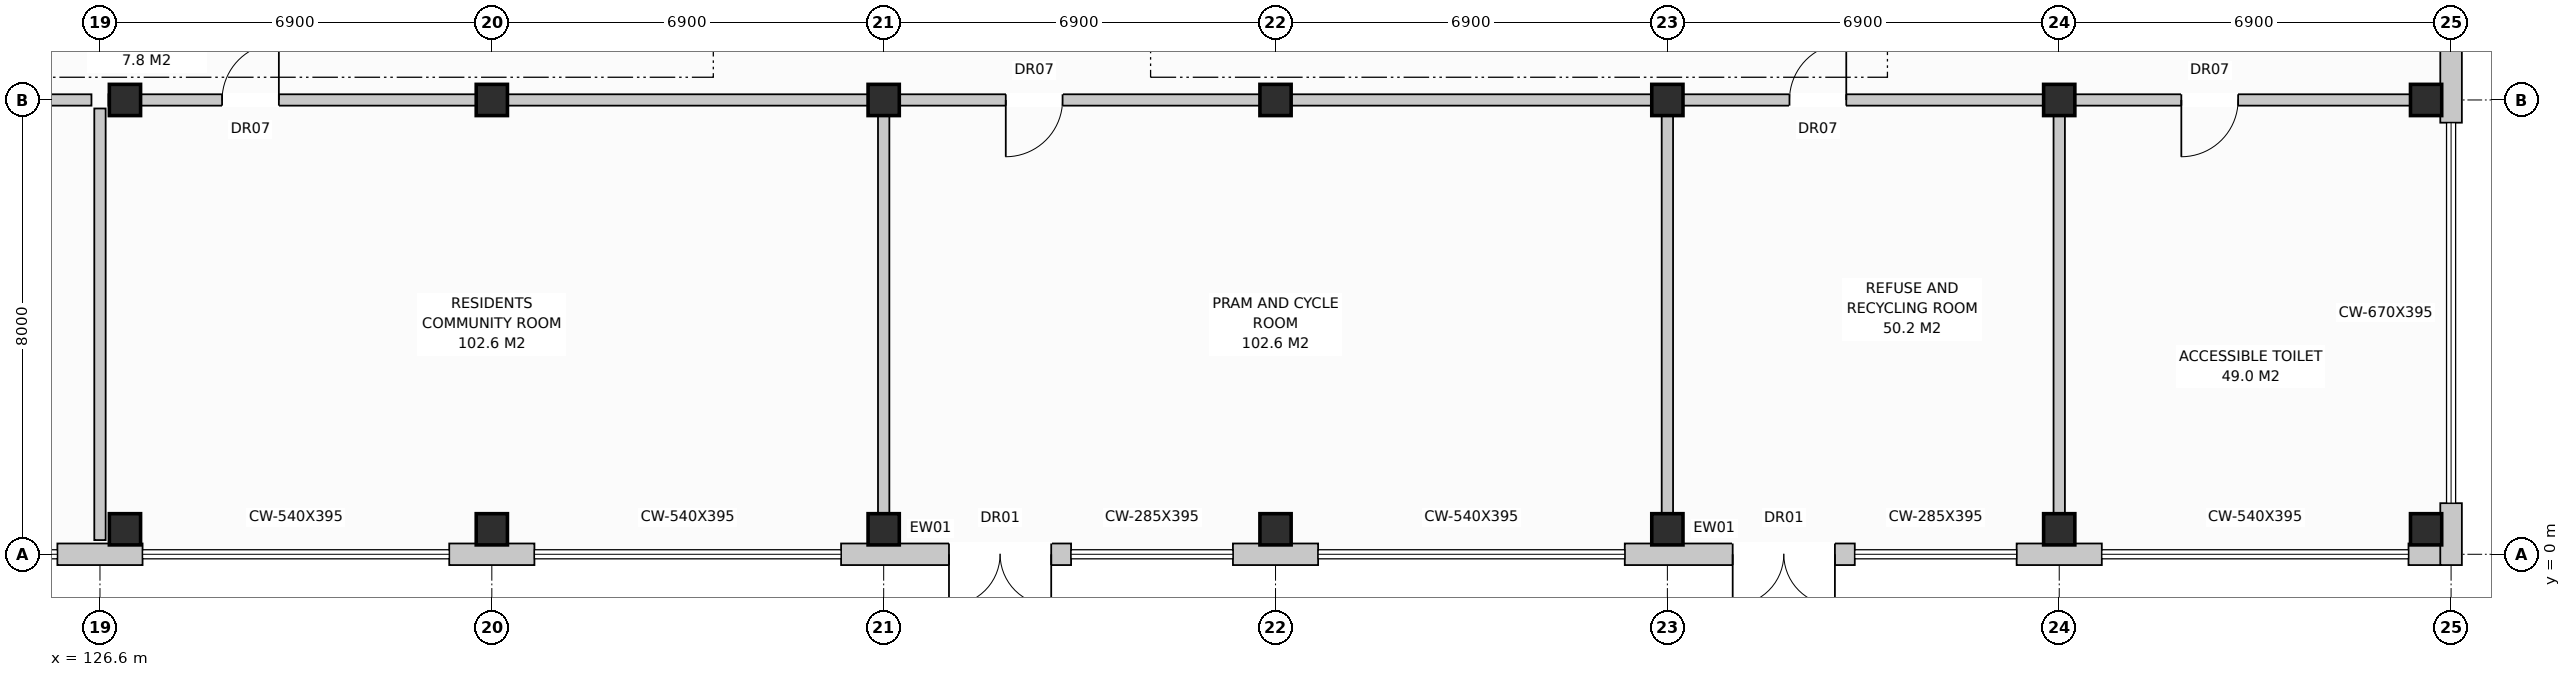
"""IFC4 building model, lengths in metres.
Left out: names, types, materials, properties, quantities, classifications, styles, units other than length and angle.
Written with IfcOpenShell. Run it as: python <this file> out.ifc"""

import sys

from ifc_helpers import new_model, si_unit, direction, frame, frame_2d, origin, origin_with_axes, origin_2d, place, context, subcontext, project, spatial, rectangle, extrude, element, fill, save


model = new_model("IFC4")
c1 = context("Model", 3, precision=1e-05, world=origin(), true_north=direction((0.0, 1.0)))
c2 = subcontext(c1, "Body", "Model", "MODEL_VIEW")
j1 = project(units=[si_unit("LENGTHUNIT", "METRE"), si_unit("PLANEANGLEUNIT", "RADIAN")], contexts=[c1])
p1 = place(None, origin())
s1 = spatial("IfcSite", under=j1, at=p1, CompositionType="ELEMENT")
p2 = place(p1, origin())
s2 = spatial("IfcBuilding", under=s1, at=p2, CompositionType="ELEMENT")
p3 = place(p2, origin())
s3 = spatial("IfcBuildingStorey", under=s2, at=p3, CompositionType="ELEMENT", Elevation=0.0)
for number, where, z_axis, x_axis in (
    (1, (127.04, 0.44, 0.0), (0.0, 0.0, 1.0), (1.0, 0.0, 0.0)),
    (2, (127.04, 8.0, 0.0), (0.0, 0.0, 1.0), (1.0, 0.0, 0.0)),
    (3, (133.5, 0.44, 0.0), (0.0, 0.0, 1.0), (1.0, 0.0, 0.0)),
    (4, (133.5, 8.0, 0.0), (0.0, 0.0, 1.0), (1.0, 0.0, 0.0)),
    (5, (140.4, 0.44, 0.0), (0.0, 0.0, 1.0), (1.0, 0.0, 0.0)),
    (6, (140.4, 8.0, 0.0), (0.0, 0.0, 1.0), (1.0, 0.0, 0.0)),
    (7, (147.3, 0.44, 0.0), (0.0, 0.0, 1.0), (1.0, 0.0, 0.0)),
    (8, (147.3, 8.0, 0.0), (0.0, 0.0, 1.0), (1.0, 0.0, 0.0)),
    (9, (154.2, 0.44, 0.0), (0.0, 0.0, 1.0), (1.0, 0.0, 0.0)),
    (10, (154.2, 8.0, 0.0), (0.0, 0.0, 1.0), (1.0, 0.0, 0.0)),
    (11, (161.1, 0.44, 0.0), (0.0, 0.0, 1.0), (1.0, 0.0, 0.0)),
    (12, (161.1, 8.0, 0.0), (0.0, 0.0, 1.0), (1.0, 0.0, 0.0)),
    (13, (167.56, 0.44, 0.0), (0.0, 0.0, 1.0), (1.0, 0.0, 0.0)),
    (14, (167.56, 8.0, 0.0), (0.0, 0.0, 1.0), (1.0, 0.0, 0.0)),
):
    element("IfcColumn", number, at=place(p3, frame(where, z_axis=z_axis, x_axis=x_axis)), inside=s3, PredefinedType="COLUMN", context=c2, shape_type="SweptSolid", body=[
        extrude(rectangle(XDim=0.55, YDim=0.55, at=origin_2d()), origin(), (0.0, 0.0, 1.0), 4.4),
    ])
for number, where, z_axis, x_axis in (
    (15, (125.85, 0.0, 0.0), (0.0, 0.0, 1.0), (1.0, 0.0, 0.0)),
    (16, (132.75, 0.0, 0.0), (0.0, 0.0, 1.0), (1.0, 0.0, 0.0)),
):
    element("IfcWall", number, at=place(p3, frame(where, z_axis=z_axis, x_axis=x_axis)), inside=s3, PredefinedType="STANDARD", context=c2, shape_type="SweptSolid", body=[
        extrude(rectangle(XDim=1.5, YDim=0.38, at=frame_2d((0.75, 0.0))), origin(), (0.0, 0.0, 1.0), 4.12),
    ])
p4 = place(p3, frame((139.65, 0.0, 0.0), z_axis=(0.0, 0.0, 1.0), x_axis=(1.0, 0.0, 0.0)))
e17 = element("IfcWall", 17, at=p4, inside=s3, PredefinedType="STANDARD", context=c2, shape_type="SweptSolid", body=[
    extrude(rectangle(XDim=4.05, YDim=0.38, at=frame_2d((2.025, 0.0))), origin(), (0.0, 0.0, 1.0), 4.12),
])
p5 = place(p4, frame((1.9, 0.0, 0.0)))
e18 = element("IfcOpeningElement", 18, at=p5, cuts=e17, PredefinedType="OPENING", context=c2, shape_type="SweptSolid", body=[
    extrude(rectangle(XDim=1.8, YDim=2.4, at=frame_2d((0.9, 1.2))), frame((0.0, 0.202, 0.0), z_axis=(0.0, -1.0, 0.0), x_axis=(1.0, 0.0, 0.0)), (0.0, 0.0, 1.0), 0.404),
])
p6 = place(p3, frame((146.55, 0.0, 0.0), z_axis=(0.0, 0.0, 1.0), x_axis=(1.0, 0.0, 0.0)))
e19 = element("IfcWall", 19, at=p6, inside=s3, PredefinedType="STANDARD", context=c2, shape_type="SweptSolid", body=[
    extrude(rectangle(XDim=1.5, YDim=0.38, at=frame_2d((0.75, 0.0))), origin(), (0.0, 0.0, 1.0), 4.12),
])
p7 = place(p3, frame((153.45, 0.0, 0.0), z_axis=(0.0, 0.0, 1.0), x_axis=(1.0, 0.0, 0.0)))
e20 = element("IfcWall", 20, at=p7, inside=s3, PredefinedType="STANDARD", context=c2, shape_type="SweptSolid", body=[
    extrude(rectangle(XDim=4.05, YDim=0.38, at=frame_2d((2.025, 0.0))), origin(), (0.0, 0.0, 1.0), 4.12),
])
p8 = place(p7, frame((1.9, 0.0, 0.0)))
e21 = element("IfcOpeningElement", 21, at=p8, cuts=e20, PredefinedType="OPENING", context=c2, shape_type="SweptSolid", body=[
    extrude(rectangle(XDim=1.8, YDim=2.4, at=frame_2d((0.9, 1.2))), frame((0.0, 0.202, 0.0), z_axis=(0.0, -1.0, 0.0), x_axis=(1.0, 0.0, 0.0)), (0.0, 0.0, 1.0), 0.404),
])
p9 = place(p3, frame((160.35, 0.0, 0.0), z_axis=(0.0, 0.0, 1.0), x_axis=(1.0, 0.0, 0.0)))
e22 = element("IfcWall", 22, at=p9, inside=s3, PredefinedType="STANDARD", context=c2, shape_type="SweptSolid", body=[
    extrude(rectangle(XDim=1.5, YDim=0.38, at=frame_2d((0.75, 0.0))), origin(), (0.0, 0.0, 1.0), 4.12),
])
p10 = place(p3, frame((167.25, 0.0, 0.0), z_axis=(0.0, 0.0, 1.0), x_axis=(1.0, 0.0, 0.0)))
e23 = element("IfcWall", 23, at=p10, inside=s3, PredefinedType="STANDARD", context=c2, shape_type="SweptSolid", body=[
    extrude(rectangle(XDim=0.57, YDim=0.38, at=frame_2d((0.285, 0.0))), origin(), (0.0, 0.0, 1.0), 4.12),
])
p11 = place(p3, frame((168.0, -0.19, 0.0), z_axis=(0.0, 0.0, 1.0), x_axis=(0.0, 1.0, 0.0)))
e24 = element("IfcWall", 24, at=p11, inside=s3, PredefinedType="STANDARD", context=c2, shape_type="SweptSolid", body=[
    extrude(rectangle(XDim=1.09, YDim=0.38, at=frame_2d((0.545, 0.0))), origin(), (0.0, 0.0, 1.0), 4.12),
])
p12 = place(p3, frame((168.0, 7.6, 0.0), z_axis=(0.0, 0.0, 1.0), x_axis=(0.0, 1.0, 0.0)))
e25 = element("IfcWall", 25, at=p12, inside=s3, PredefinedType="STANDARD", context=c2, shape_type="SweptSolid", body=[
    extrude(rectangle(XDim=3.2, YDim=0.38, at=frame_2d((1.6, 0.0))), origin(), (0.0, 0.0, 1.0), 4.12),
])
p13 = place(p3, frame((113.1, 8.0, 0.0), z_axis=(0.0, 0.0, 1.0), x_axis=(1.0, 0.0, 0.0)))
e26 = element("IfcWall", 26, at=p13, inside=s3, PredefinedType="PARTITIONING", context=c2, shape_type="SweptSolid", body=[
    extrude(rectangle(XDim=13.35, YDim=0.2, at=frame_2d((6.675, 0.0))), origin(), (0.0, 0.0, 1.0), 3.56),
])
p14 = place(p13, frame((2.0, 0.0, 0.0)))
e27 = element("IfcOpeningElement", 27, at=p14, cuts=e26, PredefinedType="OPENING", context=c2, shape_type="SweptSolid", body=[
    extrude(rectangle(XDim=1.0, YDim=2.15, at=frame_2d((0.5, 1.075))), frame((0.0, 0.112, 0.0), z_axis=(0.0, -1.0, 0.0), x_axis=(1.0, 0.0, 0.0)), (0.0, 0.0, 1.0), 0.224),
])
p15 = place(p3, frame((126.6, 0.25, 0.0), z_axis=(0.0, 0.0, 1.0), x_axis=(0.0, 1.0, 0.0)))
e28 = element("IfcWall", 28, at=p15, inside=s3, PredefinedType="PARTITIONING", context=c2, shape_type="SweptSolid", body=[
    extrude(rectangle(XDim=7.6, YDim=0.2, at=frame_2d((3.8, 0.0))), origin(), (0.0, 0.0, 1.0), 4.12),
])
p16 = place(p3, frame((126.75, 8.0, 0.0), z_axis=(0.0, 0.0, 1.0), x_axis=(1.0, 0.0, 0.0)))
e29 = element("IfcWall", 29, at=p16, inside=s3, PredefinedType="PARTITIONING", context=c2, shape_type="SweptSolid", body=[
    extrude(rectangle(XDim=13.5, YDim=0.2, at=frame_2d((6.75, 0.0))), origin(), (0.0, 0.0, 1.0), 3.56),
])
p17 = place(p16, frame((2.0, 0.0, 0.0)))
e30 = element("IfcOpeningElement", 30, at=p17, cuts=e29, PredefinedType="OPENING", context=c2, shape_type="SweptSolid", body=[
    extrude(rectangle(XDim=1.0, YDim=2.15, at=frame_2d((0.5, 1.075))), frame((0.0, 0.112, 0.0), z_axis=(0.0, -1.0, 0.0), x_axis=(1.0, 0.0, 0.0)), (0.0, 0.0, 1.0), 0.224),
])
p18 = place(p3, frame((140.4, 0.25, 0.0), z_axis=(0.0, 0.0, 1.0), x_axis=(0.0, 1.0, 0.0)))
e31 = element("IfcWall", 31, at=p18, inside=s3, PredefinedType="PARTITIONING", context=c2, shape_type="SweptSolid", body=[
    extrude(rectangle(XDim=7.6, YDim=0.2, at=frame_2d((3.8, 0.0))), origin(), (0.0, 0.0, 1.0), 4.12),
])
p19 = place(p3, frame((140.55, 8.0, 0.0), z_axis=(0.0, 0.0, 1.0), x_axis=(1.0, 0.0, 0.0)))
e32 = element("IfcWall", 32, at=p19, inside=s3, PredefinedType="PARTITIONING", context=c2, shape_type="SweptSolid", body=[
    extrude(rectangle(XDim=13.5, YDim=0.2, at=frame_2d((6.75, 0.0))), origin(), (0.0, 0.0, 1.0), 3.56),
])
p20 = place(p19, frame((2.0, 0.0, 0.0)))
e33 = element("IfcOpeningElement", 33, at=p20, cuts=e32, PredefinedType="OPENING", context=c2, shape_type="SweptSolid", body=[
    extrude(rectangle(XDim=1.0, YDim=2.15, at=frame_2d((0.5, 1.075))), frame((0.0, 0.112, 0.0), z_axis=(0.0, -1.0, 0.0), x_axis=(1.0, 0.0, 0.0)), (0.0, 0.0, 1.0), 0.224),
])
p21 = place(p3, frame((154.2, 0.25, 0.0), z_axis=(0.0, 0.0, 1.0), x_axis=(0.0, 1.0, 0.0)))
e34 = element("IfcWall", 34, at=p21, inside=s3, PredefinedType="PARTITIONING", context=c2, shape_type="SweptSolid", body=[
    extrude(rectangle(XDim=7.6, YDim=0.2, at=frame_2d((3.8, 0.0))), origin(), (0.0, 0.0, 1.0), 4.12),
])
p22 = place(p3, frame((154.35, 8.0, 0.0), z_axis=(0.0, 0.0, 1.0), x_axis=(1.0, 0.0, 0.0)))
e35 = element("IfcWall", 35, at=p22, inside=s3, PredefinedType="PARTITIONING", context=c2, shape_type="SweptSolid", body=[
    extrude(rectangle(XDim=6.6, YDim=0.2, at=frame_2d((3.3, 0.0))), origin(), (0.0, 0.0, 1.0), 3.56),
])
p23 = place(p22, frame((2.0, 0.0, 0.0)))
e36 = element("IfcOpeningElement", 36, at=p23, cuts=e35, PredefinedType="OPENING", context=c2, shape_type="SweptSolid", body=[
    extrude(rectangle(XDim=1.0, YDim=2.15, at=frame_2d((0.5, 1.075))), frame((0.0, 0.112, 0.0), z_axis=(0.0, -1.0, 0.0), x_axis=(1.0, 0.0, 0.0)), (0.0, 0.0, 1.0), 0.224),
])
p24 = place(p3, frame((161.1, 0.25, 0.0), z_axis=(0.0, 0.0, 1.0), x_axis=(0.0, 1.0, 0.0)))
e37 = element("IfcWall", 37, at=p24, inside=s3, PredefinedType="PARTITIONING", context=c2, shape_type="SweptSolid", body=[
    extrude(rectangle(XDim=7.6, YDim=0.2, at=frame_2d((3.8, 0.0))), origin(), (0.0, 0.0, 1.0), 3.56),
])
p25 = place(p3, frame((161.25, 8.0, 0.0), z_axis=(0.0, 0.0, 1.0), x_axis=(1.0, 0.0, 0.0)))
e38 = element("IfcWall", 38, at=p25, inside=s3, PredefinedType="PARTITIONING", context=c2, shape_type="SweptSolid", body=[
    extrude(rectangle(XDim=6.45, YDim=0.2, at=frame_2d((3.225, 0.0))), origin(), (0.0, 0.0, 1.0), 3.56),
])
p26 = place(p25, frame((2.0, 0.0, 0.0)))
e39 = element("IfcOpeningElement", 39, at=p26, cuts=e38, PredefinedType="OPENING", context=c2, shape_type="SweptSolid", body=[
    extrude(rectangle(XDim=1.0, YDim=2.15, at=frame_2d((0.5, 1.075))), frame((0.0, 0.112, 0.0), z_axis=(0.0, -1.0, 0.0), x_axis=(1.0, 0.0, 0.0)), (0.0, 0.0, 1.0), 0.224),
])
p27 = place(p5, frame((1.8, 0.0, 0.0), z_axis=(0.0, 0.0, 1.0), x_axis=(-1.0, 0.0, 0.0)))
e40 = element("IfcDoor", 40, at=p27, inside=s3, OperationType="DOUBLE_DOOR_SINGLE_SWING", PredefinedType="DOOR", context=c2, shape_type="SweptSolid", body=[
    extrude(rectangle(XDim=1.8, YDim=2.4, at=frame_2d((0.9, 1.2))), frame((0.0, 0.025, 0.0), z_axis=(0.0, -1.0, 0.0), x_axis=(1.0, 0.0, 0.0)), (0.0, 0.0, 1.0), 0.05),
])
fill(e18, e40)
p28 = place(p8, frame((1.8, 0.0, 0.0), z_axis=(0.0, 0.0, 1.0), x_axis=(-1.0, 0.0, 0.0)))
e41 = element("IfcDoor", 41, at=p28, inside=s3, OperationType="DOUBLE_DOOR_SINGLE_SWING", PredefinedType="DOOR", context=c2, shape_type="SweptSolid", body=[
    extrude(rectangle(XDim=1.8, YDim=2.4, at=frame_2d((0.9, 1.2))), frame((0.0, 0.025, 0.0), z_axis=(0.0, -1.0, 0.0), x_axis=(1.0, 0.0, 0.0)), (0.0, 0.0, 1.0), 0.05),
])
fill(e21, e41)
p29 = place(p17, origin_with_axes())
e42 = element("IfcDoor", 42, at=p29, inside=s3, OperationType="SINGLE_SWING_RIGHT", PredefinedType="DOOR", context=c2, shape_type="SweptSolid", body=[
    extrude(rectangle(XDim=1.0, YDim=2.15, at=frame_2d((0.5, 1.075))), frame((0.0, 0.025, 0.0), z_axis=(0.0, -1.0, 0.0), x_axis=(1.0, 0.0, 0.0)), (0.0, 0.0, 1.0), 0.05),
])
fill(e30, e42)
p30 = place(p20, frame((1.0, 0.0, 0.0), z_axis=(0.0, 0.0, 1.0), x_axis=(-1.0, 0.0, 0.0)))
e43 = element("IfcDoor", 43, at=p30, inside=s3, OperationType="SINGLE_SWING_LEFT", PredefinedType="DOOR", context=c2, shape_type="SweptSolid", body=[
    extrude(rectangle(XDim=1.0, YDim=2.15, at=frame_2d((0.5, 1.075))), frame((0.0, 0.025, 0.0), z_axis=(0.0, -1.0, 0.0), x_axis=(1.0, 0.0, 0.0)), (0.0, 0.0, 1.0), 0.05),
])
fill(e33, e43)
p31 = place(p23, origin_with_axes())
e44 = element("IfcDoor", 44, at=p31, inside=s3, OperationType="SINGLE_SWING_RIGHT", PredefinedType="DOOR", context=c2, shape_type="SweptSolid", body=[
    extrude(rectangle(XDim=1.0, YDim=2.15, at=frame_2d((0.5, 1.075))), frame((0.0, 0.025, 0.0), z_axis=(0.0, -1.0, 0.0), x_axis=(1.0, 0.0, 0.0)), (0.0, 0.0, 1.0), 0.05),
])
fill(e36, e44)
p32 = place(p26, frame((1.0, 0.0, 0.0), z_axis=(0.0, 0.0, 1.0), x_axis=(-1.0, 0.0, 0.0)))
e45 = element("IfcDoor", 45, at=p32, inside=s3, OperationType="SINGLE_SWING_LEFT", PredefinedType="DOOR", context=c2, shape_type="SweptSolid", body=[
    extrude(rectangle(XDim=1.0, YDim=2.15, at=frame_2d((0.5, 1.075))), frame((0.0, 0.025, 0.0), z_axis=(0.0, -1.0, 0.0), x_axis=(1.0, 0.0, 0.0)), (0.0, 0.0, 1.0), 0.05),
])
fill(e39, e45)
save(model, sys.argv[1])
